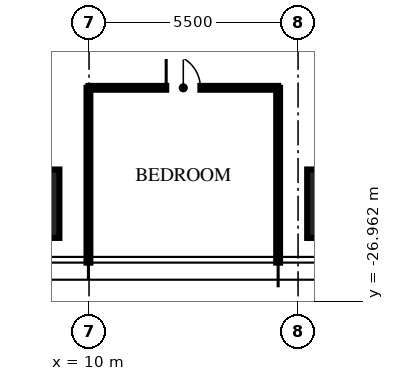
"""IFC4 building model, lengths in metres.
Left out: names, types, materials, properties, quantities, classifications, styles, units other than length and angle.
Written with IfcOpenShell. Run it as: python <this file> out.ifc"""

import sys

from ifc_helpers import new_model, si_unit, direction, frame, frame_2d, origin, origin_2d, place, context, subcontext, project, spatial, rectangle, extrude, element, fill, save


model = new_model("IFC4")
c1 = context("Model", 3, precision=1e-05, world=origin(), true_north=direction((0.0, 1.0)))
c2 = subcontext(c1, "Body", "Model", "MODEL_VIEW")
j1 = project(units=[si_unit("LENGTHUNIT", "METRE"), si_unit("PLANEANGLEUNIT", "RADIAN")], contexts=[c1])
p1 = place(None, origin())
s1 = spatial("IfcSite", under=j1, at=p1, CompositionType="ELEMENT")
p2 = place(p1, origin())
s2 = spatial("IfcBuilding", under=s1, at=p2, CompositionType="ELEMENT")
p3 = place(p2, frame((0.0, 0.0, 240.75)))
s3 = spatial("IfcBuildingStorey", under=s2, at=p3, CompositionType="ELEMENT", Elevation=240.75)
for number, where, z_axis, x_axis in (
    (1, (16.64, -24.4, 0.0), (0.0, 0.0, 1.0), (1.0, 0.0, 0.0)),
    (2, (8.32, -24.4, 0.0), (0.0, 0.0, 1.0), (1.0, 0.0, 0.0)),
):
    element("IfcColumn", number, at=place(p3, frame(where, z_axis=z_axis, x_axis=x_axis)), inside=s3, PredefinedType="COLUMN", context=c2, shape_type="SweptSolid", body=[
        extrude(rectangle(XDim=1.8, YDim=1.8, at=origin_2d()), origin(), (0.0, 0.0, 1.0), 3.75),
    ])
for number, where, z_axis, x_axis in (
    (3, (9.984, -21.35, 0.0), (0.0, 0.0, 1.0), (0.0, -1.0, 0.0)),
    (4, (14.976, -21.35, 0.0), (0.0, 0.0, 1.0), (0.0, -1.0, 0.0)),
):
    element("IfcWall", number, at=place(p3, frame(where, z_axis=z_axis, x_axis=x_axis)), inside=s3, PredefinedType="PARTITIONING", context=c2, shape_type="SweptSolid", body=[
        extrude(rectangle(XDim=4.6, YDim=0.1, at=frame_2d((2.3, 0.0))), origin(), (0.0, 0.0, 1.0), 2.91),
    ])
p4 = place(p3, frame((9.984, -21.35, 0.0), z_axis=(0.0, 0.0, 1.0), x_axis=(1.0, 0.0, 0.0)))
e5 = element("IfcWall", 5, at=p4, inside=s3, PredefinedType="PARTITIONING", context=c2, shape_type="SweptSolid", body=[
    extrude(rectangle(XDim=4.992, YDim=0.1, at=frame_2d((2.496, 0.0))), origin(), (0.0, 0.0, 1.0), 2.81),
])
p5 = place(p4, frame((2.046, 0.0, 0.0)))
e6 = element("IfcOpeningElement", 6, at=p5, cuts=e5, PredefinedType="OPENING", context=c2, shape_type="SweptSolid", body=[
    extrude(rectangle(XDim=0.9, YDim=2.1, at=frame_2d((0.45, 1.05))), frame((0.0, 0.06, 0.0), z_axis=(0.0, -1.0, 0.0), x_axis=(1.0, 0.0, 0.0)), (0.0, 0.0, 1.0), 0.12),
])
p6 = place(p5, origin())
e7 = element("IfcDoor", 7, at=p6, inside=s3, OperationType="SINGLE_SWING_LEFT", PredefinedType="DOOR", context=c2, shape_type="SweptSolid", body=[
    extrude(rectangle(XDim=0.9, YDim=2.1, at=frame_2d((0.45, 1.05))), frame((0.0, 0.025, 0.0), z_axis=(0.0, -1.0, 0.0), x_axis=(1.0, 0.0, 0.0)), (0.0, 0.0, 1.0), 0.05),
])
fill(e6, e7)
save(model, sys.argv[1])
